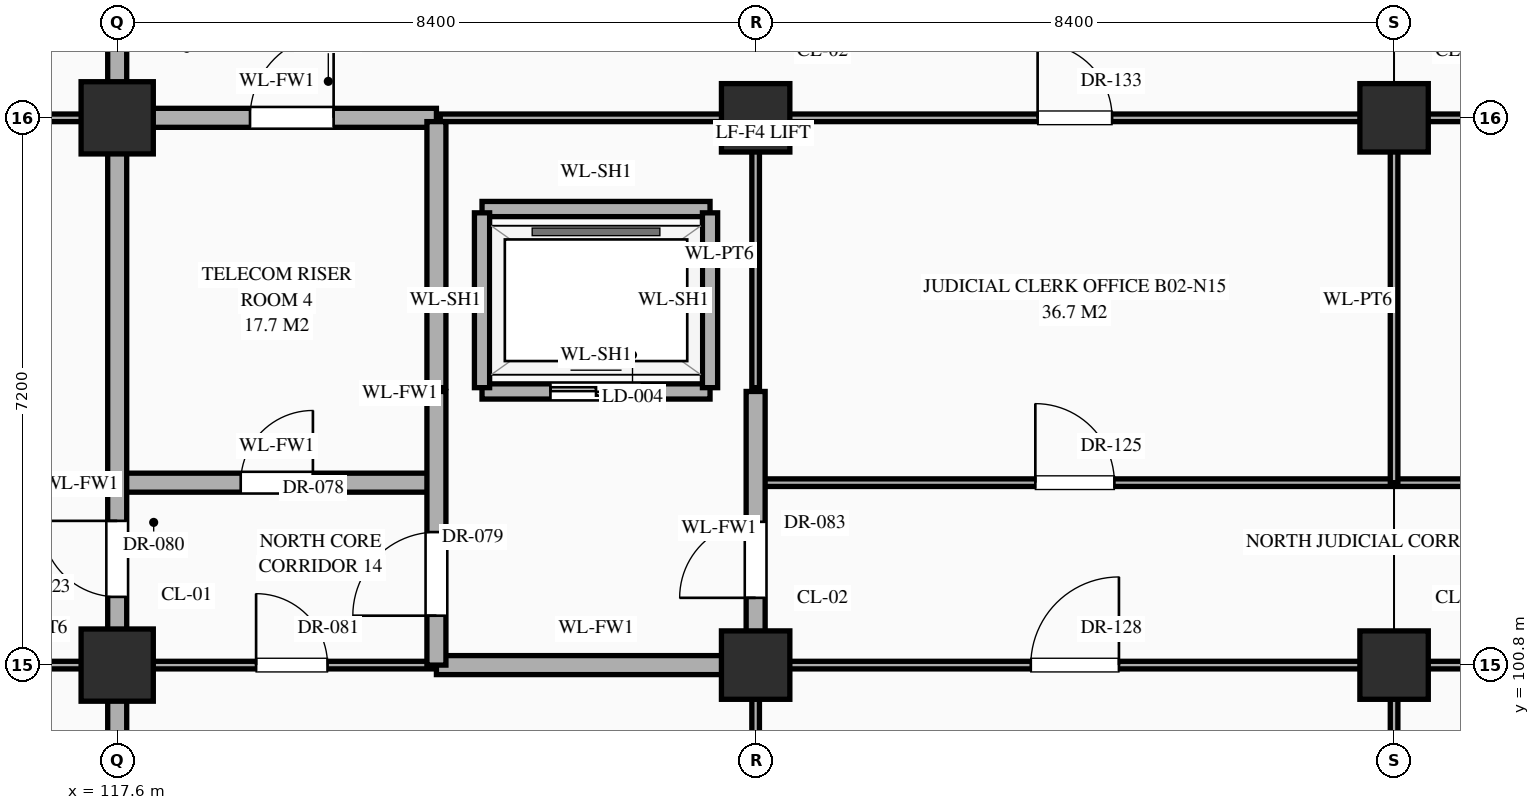
"""IFC4 building model, lengths in metres.
Left out: names, types, materials, properties, quantities, classifications, styles, units other than length and angle.
Written with IfcOpenShell. Run it as: python <this file> out.ifc"""

import sys

from ifc_helpers import new_model, si_unit, direction, frame, frame_2d, origin, origin_2d, place, context, subcontext, project, spatial, rectangle, extrude, element, fill, save


model = new_model("IFC4")
c1 = context("Model", 3, precision=1e-05, world=origin(), true_north=direction((0.0, 1.0)))
c2 = subcontext(c1, "Body", "Model", "MODEL_VIEW")
j1 = project(units=[si_unit("LENGTHUNIT", "METRE"), si_unit("PLANEANGLEUNIT", "RADIAN")], contexts=[c1])
p1 = place(None, origin())
s1 = spatial("IfcSite", under=j1, at=p1, CompositionType="ELEMENT")
p2 = place(p1, origin())
s2 = spatial("IfcBuilding", under=s1, at=p2, CompositionType="ELEMENT")
p3 = place(p2, frame((0.0, 0.0, -10.2)))
s3 = spatial("IfcBuildingStorey", under=s2, at=p3, CompositionType="ELEMENT", Elevation=-10.2)
for number, where, z_axis, x_axis in (
    (1, (117.6, 100.8, 0.0), (0.0, 0.0, 1.0), (1.0, 0.0, 0.0)),
    (2, (117.6, 108.0, 0.0), (0.0, 0.0, 1.0), (1.0, 0.0, 0.0)),
):
    element("IfcColumn", number, at=place(p3, frame(where, z_axis=z_axis, x_axis=x_axis)), inside=s3, PredefinedType="COLUMN", context=c2, shape_type="SweptSolid", body=[
        extrude(rectangle(XDim=0.95, YDim=0.95, at=origin_2d()), origin(), (0.0, 0.0, 1.0), 4.8),
    ])
for number, where, z_axis, x_axis in (
    (3, (126.0, 100.8, 0.0), (0.0, 0.0, 1.0), (1.0, 0.0, 0.0)),
    (4, (126.0, 108.0, 0.0), (0.0, 0.0, 1.0), (1.0, 0.0, 0.0)),
    (5, (134.4, 100.8, 0.0), (0.0, 0.0, 1.0), (1.0, 0.0, 0.0)),
    (6, (134.4, 108.0, 0.0), (0.0, 0.0, 1.0), (1.0, 0.0, 0.0)),
):
    element("IfcColumn", number, at=place(p3, frame(where, z_axis=z_axis, x_axis=x_axis)), inside=s3, PredefinedType="COLUMN", context=c2, shape_type="SweptSolid", body=[
        extrude(rectangle(XDim=0.9, YDim=0.9, at=origin_2d()), origin(), (0.0, 0.0, 1.0), 4.8),
    ])
p4 = place(p3, frame((109.2, 100.8, 0.0), z_axis=(0.0, 0.0, 1.0), x_axis=(1.0, 0.0, 0.0)))
e7 = element("IfcWall", 7, at=p4, inside=s3, PredefinedType="STANDARD", context=c2, shape_type="SweptSolid", body=[
    extrude(rectangle(XDim=12.6, YDim=0.1, at=frame_2d((6.3, 0.0))), origin(), (0.0, 0.0, 1.0), 3.63),
])
p5 = place(p4, frame((10.228, 0.0, 0.0)))
e8 = element("IfcOpeningElement", 8, at=p5, cuts=e7, PredefinedType="OPENING", context=c2, shape_type="SweptSolid", body=[
    extrude(rectangle(XDim=0.94, YDim=2.3, at=frame_2d((0.47, 1.15))), frame((0.0, 0.062, 0.0), z_axis=(0.0, -1.0, 0.0), x_axis=(1.0, 0.0, 0.0)), (0.0, 0.0, 1.0), 0.124),
])
p6 = place(p4, frame((1.468, 0.0, 0.0)))
e9 = element("IfcOpeningElement", 9, at=p6, cuts=e7, PredefinedType="OPENING", context=c2, shape_type="SweptSolid", body=[
    extrude(rectangle(XDim=0.86, YDim=2.1, at=frame_2d((0.43, 1.05))), frame((0.0, 0.062, 0.0), z_axis=(0.0, -1.0, 0.0), x_axis=(1.0, 0.0, 0.0)), (0.0, 0.0, 1.0), 0.124),
])
p7 = place(p4, frame((4.14, 0.0, 0.0)))
e10 = element("IfcOpeningElement", 10, at=p7, cuts=e7, PredefinedType="OPENING", context=c2, shape_type="SweptSolid", body=[
    extrude(rectangle(XDim=0.92, YDim=2.15, at=frame_2d((0.46, 1.075))), frame((0.0, 0.062, 0.0), z_axis=(0.0, -1.0, 0.0), x_axis=(1.0, 0.0, 0.0)), (0.0, 0.0, 1.0), 0.124),
])
p8 = place(p4, frame((6.423, 0.0, 0.0)))
e11 = element("IfcOpeningElement", 11, at=p8, cuts=e7, PredefinedType="OPENING", context=c2, shape_type="SweptSolid", body=[
    extrude(rectangle(XDim=0.96, YDim=2.2, at=frame_2d((0.48, 1.1))), frame((0.0, 0.062, 0.0), z_axis=(0.0, -1.0, 0.0), x_axis=(1.0, 0.0, 0.0)), (0.0, 0.0, 1.0), 0.124),
])
p9 = place(p3, frame((121.8, 100.8, 0.0), z_axis=(0.0, 0.0, 1.0), x_axis=(1.0, 0.0, 0.0)))
e12 = element("IfcWall", 12, at=p9, inside=s3, PredefinedType="STANDARD", context=c2, shape_type="SweptSolid", body=[
    extrude(rectangle(XDim=4.2, YDim=0.25, at=frame_2d((2.1, 0.0))), origin(), (0.0, 0.0, 1.0), 3.63),
])
p10 = place(p3, frame((126.0, 100.8, 0.0), z_axis=(0.0, 0.0, 1.0), x_axis=(1.0, 0.0, 0.0)))
e13 = element("IfcWall", 13, at=p10, inside=s3, PredefinedType="STANDARD", context=c2, shape_type="SweptSolid", body=[
    extrude(rectangle(XDim=25.2, YDim=0.1, at=frame_2d((12.6, 0.0))), origin(), (0.0, 0.0, 1.0), 3.63),
])
p11 = place(p10, frame((3.62, 0.0, 0.0)))
e14 = element("IfcOpeningElement", 14, at=p11, cuts=e13, PredefinedType="OPENING", context=c2, shape_type="SweptSolid", body=[
    extrude(rectangle(XDim=1.16, YDim=2.3, at=frame_2d((0.58, 1.15))), frame((0.0, 0.062, 0.0), z_axis=(0.0, -1.0, 0.0), x_axis=(1.0, 0.0, 0.0)), (0.0, 0.0, 1.0), 0.124),
])
p12 = place(p10, frame((9.685, 0.0, 0.0)))
e15 = element("IfcOpeningElement", 15, at=p12, cuts=e13, PredefinedType="OPENING", context=c2, shape_type="SweptSolid", body=[
    extrude(rectangle(XDim=1.2, YDim=2.35, at=frame_2d((0.6, 1.175))), frame((0.0, 0.062, 0.0), z_axis=(0.0, -1.0, 0.0), x_axis=(1.0, 0.0, 0.0)), (0.0, 0.0, 1.0), 0.124),
])
p13 = place(p10, frame((12.38, 0.0, 0.0)))
e16 = element("IfcOpeningElement", 16, at=p13, cuts=e13, PredefinedType="OPENING", context=c2, shape_type="SweptSolid", body=[
    extrude(rectangle(XDim=1.24, YDim=2.3, at=frame_2d((0.62, 1.15))), frame((0.0, 0.062, 0.0), z_axis=(0.0, -1.0, 0.0), x_axis=(1.0, 0.0, 0.0)), (0.0, 0.0, 1.0), 0.124),
])
p14 = place(p10, frame((14.675, 0.0, 0.0)))
e17 = element("IfcOpeningElement", 17, at=p14, cuts=e13, PredefinedType="OPENING", context=c2, shape_type="SweptSolid", body=[
    extrude(rectangle(XDim=1.28, YDim=2.35, at=frame_2d((0.64, 1.175))), frame((0.0, 0.062, 0.0), z_axis=(0.0, -1.0, 0.0), x_axis=(1.0, 0.0, 0.0)), (0.0, 0.0, 1.0), 0.124),
])
p15 = place(p10, frame((20.542, 0.0, 0.0)))
e18 = element("IfcOpeningElement", 18, at=p15, cuts=e13, PredefinedType="OPENING", context=c2, shape_type="SweptSolid", body=[
    extrude(rectangle(XDim=0.94, YDim=2.3, at=frame_2d((0.47, 1.15))), frame((0.0, 0.062, 0.0), z_axis=(0.0, -1.0, 0.0), x_axis=(1.0, 0.0, 0.0)), (0.0, 0.0, 1.0), 0.124),
])
p16 = place(p3, frame((109.2, 103.2, 0.0), z_axis=(0.0, 0.0, 1.0), x_axis=(1.0, 0.0, 0.0)))
e19 = element("IfcWall", 19, at=p16, inside=s3, PredefinedType="STANDARD", context=c2, shape_type="SweptSolid", body=[
    extrude(rectangle(XDim=8.4, YDim=0.1, at=frame_2d((4.2, 0.0))), origin(), (0.0, 0.0, 1.0), 4.48),
])
p17 = place(p16, frame((3.75, 0.0, 0.0)))
e20 = element("IfcOpeningElement", 20, at=p17, cuts=e19, PredefinedType="OPENING", context=c2, shape_type="SweptSolid", body=[
    extrude(rectangle(XDim=0.9, YDim=2.15, at=frame_2d((0.45, 1.075))), frame((0.0, 0.062, 0.0), z_axis=(0.0, -1.0, 0.0), x_axis=(1.0, 0.0, 0.0)), (0.0, 0.0, 1.0), 0.124),
])
p18 = place(p3, frame((117.6, 103.2, 0.0), z_axis=(0.0, 0.0, 1.0), x_axis=(1.0, 0.0, 0.0)))
e21 = element("IfcWall", 21, at=p18, inside=s3, PredefinedType="STANDARD", context=c2, shape_type="SweptSolid", body=[
    extrude(rectangle(XDim=4.2, YDim=0.25, at=frame_2d((2.1, 0.0))), origin(), (0.0, 0.0, 1.0), 4.48),
])
p19 = place(p18, frame((1.625, 0.0, 0.0)))
e22 = element("IfcOpeningElement", 22, at=p19, cuts=e21, PredefinedType="OPENING", context=c2, shape_type="SweptSolid", body=[
    extrude(rectangle(XDim=0.95, YDim=2.15, at=frame_2d((0.475, 1.075))), frame((0.0, 0.137, 0.0), z_axis=(0.0, -1.0, 0.0), x_axis=(1.0, 0.0, 0.0)), (0.0, 0.0, 1.0), 0.274),
])
p20 = place(p3, frame((126.0, 103.2, 0.0), z_axis=(0.0, 0.0, 1.0), x_axis=(1.0, 0.0, 0.0)))
e23 = element("IfcWall", 23, at=p20, inside=s3, PredefinedType="STANDARD", context=c2, shape_type="SweptSolid", body=[
    extrude(rectangle(XDim=25.2, YDim=0.1, at=frame_2d((12.6, 0.0))), origin(), (0.0, 0.0, 1.0), 4.48),
])
p21 = place(p20, frame((3.68, 0.0, 0.0)))
e24 = element("IfcOpeningElement", 24, at=p21, cuts=e23, PredefinedType="OPENING", context=c2, shape_type="SweptSolid", body=[
    extrude(rectangle(XDim=1.04, YDim=2.2, at=frame_2d((0.52, 1.1))), frame((0.0, 0.062, 0.0), z_axis=(0.0, -1.0, 0.0), x_axis=(1.0, 0.0, 0.0)), (0.0, 0.0, 1.0), 0.124),
])
p22 = place(p20, frame((12.06, 0.0, 0.0)))
e25 = element("IfcOpeningElement", 25, at=p22, cuts=e23, PredefinedType="OPENING", context=c2, shape_type="SweptSolid", body=[
    extrude(rectangle(XDim=1.08, YDim=2.25, at=frame_2d((0.54, 1.125))), frame((0.0, 0.062, 0.0), z_axis=(0.0, -1.0, 0.0), x_axis=(1.0, 0.0, 0.0)), (0.0, 0.0, 1.0), 0.124),
])
p23 = place(p20, frame((20.44, 0.0, 0.0)))
e26 = element("IfcOpeningElement", 26, at=p23, cuts=e23, PredefinedType="OPENING", context=c2, shape_type="SweptSolid", body=[
    extrude(rectangle(XDim=1.12, YDim=2.25, at=frame_2d((0.56, 1.125))), frame((0.0, 0.062, 0.0), z_axis=(0.0, -1.0, 0.0), x_axis=(1.0, 0.0, 0.0)), (0.0, 0.0, 1.0), 0.124),
])
p24 = place(p3, frame((122.4, 104.4, 0.0), z_axis=(0.0, 0.0, 1.0), x_axis=(1.0, 0.0, 0.0)))
e27 = element("IfcWall", 27, at=p24, inside=s3, PredefinedType="STANDARD", context=c2, shape_type="SweptSolid", body=[
    extrude(rectangle(XDim=3.0, YDim=0.2, at=frame_2d((1.5, 0.0))), origin(), (0.0, 0.0, 1.0), 4.48),
])
p25 = place(p24, frame((0.9, 0.0, 0.0)))
e28 = element("IfcOpeningElement", 28, at=p25, cuts=e27, PredefinedType="OPENING", context=c2, shape_type="SweptSolid", body=[
    extrude(rectangle(XDim=1.2, YDim=2.15, at=frame_2d((0.6, 1.075))), frame((0.0, 0.112, 0.0), z_axis=(0.0, -1.0, 0.0), x_axis=(1.0, 0.0, 0.0)), (0.0, 0.0, 1.0), 0.224),
])
p26 = place(p3, frame((122.4, 106.8, 0.0), z_axis=(0.0, 0.0, 1.0), x_axis=(1.0, 0.0, 0.0)))
e29 = element("IfcWall", 29, at=p26, inside=s3, PredefinedType="STANDARD", context=c2, shape_type="SweptSolid", body=[
    extrude(rectangle(XDim=3.0, YDim=0.2, at=frame_2d((1.5, 0.0))), origin(), (0.0, 0.0, 1.0), 4.48),
])
p27 = place(p3, frame((109.2, 108.0, 0.0), z_axis=(0.0, 0.0, 1.0), x_axis=(1.0, 0.0, 0.0)))
e30 = element("IfcWall", 30, at=p27, inside=s3, PredefinedType="STANDARD", context=c2, shape_type="SweptSolid", body=[
    extrude(rectangle(XDim=8.4, YDim=0.1, at=frame_2d((4.2, 0.0))), origin(), (0.0, 0.0, 1.0), 3.63),
])
p28 = place(p27, frame((3.7, 0.0, 0.0)))
e31 = element("IfcOpeningElement", 31, at=p28, cuts=e30, PredefinedType="OPENING", context=c2, shape_type="SweptSolid", body=[
    extrude(rectangle(XDim=1.0, YDim=2.25, at=frame_2d((0.5, 1.125))), frame((0.0, 0.062, 0.0), z_axis=(0.0, -1.0, 0.0), x_axis=(1.0, 0.0, 0.0)), (0.0, 0.0, 1.0), 0.124),
])
p29 = place(p3, frame((117.6, 108.0, 0.0), z_axis=(0.0, 0.0, 1.0), x_axis=(1.0, 0.0, 0.0)))
e32 = element("IfcWall", 32, at=p29, inside=s3, PredefinedType="STANDARD", context=c2, shape_type="SweptSolid", body=[
    extrude(rectangle(XDim=4.2, YDim=0.25, at=frame_2d((2.1, 0.0))), origin(), (0.0, 0.0, 1.0), 3.63),
])
p30 = place(p29, frame((1.748, 0.0, 0.0)))
e33 = element("IfcOpeningElement", 33, at=p30, cuts=e32, PredefinedType="OPENING", context=c2, shape_type="SweptSolid", body=[
    extrude(rectangle(XDim=1.1, YDim=2.2, at=frame_2d((0.55, 1.1))), frame((0.0, 0.137, 0.0), z_axis=(0.0, -1.0, 0.0), x_axis=(1.0, 0.0, 0.0)), (0.0, 0.0, 1.0), 0.274),
])
p31 = place(p3, frame((121.85, 108.0, 0.0), z_axis=(0.0, 0.0, 1.0), x_axis=(1.0, 0.0, 0.0)))
e34 = element("IfcWall", 34, at=p31, inside=s3, PredefinedType="STANDARD", context=c2, shape_type="SweptSolid", body=[
    extrude(rectangle(XDim=4.1, YDim=0.1, at=frame_2d((2.05, 0.0))), origin(), (0.0, 0.0, 1.0), 3.63),
])
p32 = place(p3, frame((126.0, 108.0, 0.0), z_axis=(0.0, 0.0, 1.0), x_axis=(1.0, 0.0, 0.0)))
e35 = element("IfcWall", 35, at=p32, inside=s3, PredefinedType="STANDARD", context=c2, shape_type="SweptSolid", body=[
    extrude(rectangle(XDim=25.2, YDim=0.1, at=frame_2d((12.6, 0.0))), origin(), (0.0, 0.0, 1.0), 3.63),
])
p33 = place(p32, frame((3.71, 0.0, 0.0)))
e36 = element("IfcOpeningElement", 36, at=p33, cuts=e35, PredefinedType="OPENING", context=c2, shape_type="SweptSolid", body=[
    extrude(rectangle(XDim=0.98, YDim=2.35, at=frame_2d((0.49, 1.175))), frame((0.0, 0.062, 0.0), z_axis=(0.0, -1.0, 0.0), x_axis=(1.0, 0.0, 0.0)), (0.0, 0.0, 1.0), 0.124),
])
p34 = place(p32, frame((12.09, 0.0, 0.0)))
e37 = element("IfcOpeningElement", 37, at=p34, cuts=e35, PredefinedType="OPENING", context=c2, shape_type="SweptSolid", body=[
    extrude(rectangle(XDim=1.02, YDim=2.4, at=frame_2d((0.51, 1.2))), frame((0.0, 0.062, 0.0), z_axis=(0.0, -1.0, 0.0), x_axis=(1.0, 0.0, 0.0)), (0.0, 0.0, 1.0), 0.124),
])
p35 = place(p32, frame((20.482, 0.0, 0.0)))
e38 = element("IfcOpeningElement", 38, at=p35, cuts=e35, PredefinedType="OPENING", context=c2, shape_type="SweptSolid", body=[
    extrude(rectangle(XDim=1.06, YDim=2.4, at=frame_2d((0.53, 1.2))), frame((0.0, 0.062, 0.0), z_axis=(0.0, -1.0, 0.0), x_axis=(1.0, 0.0, 0.0)), (0.0, 0.0, 1.0), 0.124),
])
p36 = place(p3, frame((117.6, 91.2, 0.0), z_axis=(0.0, 0.0, 1.0), x_axis=(0.0, 1.0, 0.0)))
e39 = element("IfcWall", 39, at=p36, inside=s3, PredefinedType="STANDARD", context=c2, shape_type="SweptSolid", body=[
    extrude(rectangle(XDim=23.96, YDim=0.25, at=frame_2d((11.98, 0.0))), origin(), (0.0, 0.0, 1.0), 3.73),
])
p37 = place(p36, frame((0.452, 0.0, 0.0)))
e40 = element("IfcOpeningElement", 40, at=p37, cuts=e39, PredefinedType="OPENING", context=c2, shape_type="SweptSolid", body=[
    extrude(rectangle(XDim=1.1, YDim=2.2, at=frame_2d((0.55, 1.1))), frame((0.0, 0.137, 0.0), z_axis=(0.0, -1.0, 0.0), x_axis=(1.0, 0.0, 0.0)), (0.0, 0.0, 1.0), 0.274),
])
p38 = place(p36, frame((10.498, 0.0, 0.0)))
e41 = element("IfcOpeningElement", 41, at=p38, cuts=e39, PredefinedType="OPENING", context=c2, shape_type="SweptSolid", body=[
    extrude(rectangle(XDim=1.0, YDim=2.2, at=frame_2d((0.5, 1.1))), frame((0.0, 0.137, 0.0), z_axis=(0.0, -1.0, 0.0), x_axis=(1.0, 0.0, 0.0)), (0.0, 0.0, 1.0), 0.274),
])
p39 = place(p36, frame((3.323, 0.0, 0.0)))
e42 = element("IfcOpeningElement", 42, at=p39, cuts=e39, PredefinedType="OPENING", context=c2, shape_type="SweptSolid", body=[
    extrude(rectangle(XDim=0.95, YDim=2.15, at=frame_2d((0.475, 1.075))), frame((0.0, 0.137, 0.0), z_axis=(0.0, -1.0, 0.0), x_axis=(1.0, 0.0, 0.0)), (0.0, 0.0, 1.0), 0.274),
])
p40 = place(p36, frame((17.698, 0.0, 0.0)))
e43 = element("IfcOpeningElement", 43, at=p40, cuts=e39, PredefinedType="OPENING", context=c2, shape_type="SweptSolid", body=[
    extrude(rectangle(XDim=1.0, YDim=2.2, at=frame_2d((0.5, 1.1))), frame((0.0, 0.137, 0.0), z_axis=(0.0, -1.0, 0.0), x_axis=(1.0, 0.0, 0.0)), (0.0, 0.0, 1.0), 0.274),
])
p41 = place(p3, frame((121.8, 100.8, 0.0), z_axis=(0.0, 0.0, 1.0), x_axis=(0.0, 1.0, 0.0)))
e44 = element("IfcWall", 44, at=p41, inside=s3, PredefinedType="STANDARD", context=c2, shape_type="SweptSolid", body=[
    extrude(rectangle(XDim=3.6, YDim=0.25, at=frame_2d((1.8, 0.0))), origin(), (0.0, 0.0, 1.0), 4.48),
])
p42 = place(p41, frame((0.65, 0.0, 0.0)))
e45 = element("IfcOpeningElement", 45, at=p42, cuts=e44, PredefinedType="OPENING", context=c2, shape_type="SweptSolid", body=[
    extrude(rectangle(XDim=1.1, YDim=2.2, at=frame_2d((0.55, 1.1))), frame((0.0, 0.137, 0.0), z_axis=(0.0, -1.0, 0.0), x_axis=(1.0, 0.0, 0.0)), (0.0, 0.0, 1.0), 0.274),
])
p43 = place(p3, frame((121.8, 104.45, 0.0), z_axis=(0.0, 0.0, 1.0), x_axis=(0.0, 1.0, 0.0)))
e46 = element("IfcWall", 46, at=p43, inside=s3, PredefinedType="STANDARD", context=c2, shape_type="SweptSolid", body=[
    extrude(rectangle(XDim=3.5, YDim=0.25, at=frame_2d((1.75, 0.0))), origin(), (0.0, 0.0, 1.0), 4.48),
])
for number, where, z_axis, x_axis in (
    (47, (122.4, 104.45, 0.0), (0.0, 0.0, 1.0), (0.0, 1.0, 0.0)),
    (48, (125.4, 104.45, 0.0), (0.0, 0.0, 1.0), (0.0, 1.0, 0.0)),
):
    element("IfcWall", number, at=place(p3, frame(where, z_axis=z_axis, x_axis=x_axis)), inside=s3, PredefinedType="STANDARD", context=c2, shape_type="SweptSolid", body=[
        extrude(rectangle(XDim=2.3, YDim=0.2, at=frame_2d((1.15, 0.0))), origin(), (0.0, 0.0, 1.0), 4.48),
    ])
p44 = place(p3, frame((126.0, 96.0, 0.0), z_axis=(0.0, 0.0, 1.0), x_axis=(0.0, 1.0, 0.0)))
e49 = element("IfcWall", 49, at=p44, inside=s3, PredefinedType="STANDARD", context=c2, shape_type="SweptSolid", body=[
    extrude(rectangle(XDim=4.8, YDim=0.1, at=frame_2d((2.4, 0.0))), origin(), (0.0, 0.0, 1.0), 3.73),
])
p45 = place(p3, frame((126.0, 100.8, 0.0), z_axis=(0.0, 0.0, 1.0), x_axis=(0.0, 1.0, 0.0)))
e50 = element("IfcWall", 50, at=p45, inside=s3, PredefinedType="STANDARD", context=c2, shape_type="SweptSolid", body=[
    extrude(rectangle(XDim=3.6, YDim=0.25, at=frame_2d((1.8, 0.0))), origin(), (0.0, 0.0, 1.0), 3.73),
])
p46 = place(p45, frame((0.885, 0.0, 0.0)))
e51 = element("IfcOpeningElement", 51, at=p46, cuts=e50, PredefinedType="OPENING", context=c2, shape_type="SweptSolid", body=[
    extrude(rectangle(XDim=1.0, YDim=2.2, at=frame_2d((0.5, 1.1))), frame((0.0, 0.137, 0.0), z_axis=(0.0, -1.0, 0.0), x_axis=(1.0, 0.0, 0.0)), (0.0, 0.0, 1.0), 0.274),
])
p47 = place(p3, frame((126.0, 104.45, 0.0), z_axis=(0.0, 0.0, 1.0), x_axis=(0.0, 1.0, 0.0)))
e52 = element("IfcWall", 52, at=p47, inside=s3, PredefinedType="STANDARD", context=c2, shape_type="SweptSolid", body=[
    extrude(rectangle(XDim=3.5, YDim=0.1, at=frame_2d((1.75, 0.0))), origin(), (0.0, 0.0, 1.0), 3.73),
])
for number, where, z_axis, x_axis in (
    (53, (134.4, 96.0, 0.0), (0.0, 0.0, 1.0), (0.0, 1.0, 0.0)),
    (54, (134.4, 103.2, 0.0), (0.0, 0.0, 1.0), (0.0, 1.0, 0.0)),
):
    element("IfcWall", number, at=place(p3, frame(where, z_axis=z_axis, x_axis=x_axis)), inside=s3, PredefinedType="STANDARD", context=c2, shape_type="SweptSolid", body=[
        extrude(rectangle(XDim=4.8, YDim=0.1, at=frame_2d((2.4, 0.0))), origin(), (0.0, 0.0, 1.0), 3.73),
    ])
p48 = place(p25, origin())
e55 = element("IfcDoor", 55, at=p48, inside=s3, OperationType="DOUBLE_DOOR_SLIDING", PredefinedType="DOOR", context=c2, shape_type="SweptSolid", body=[
    extrude(rectangle(XDim=1.2, YDim=2.15, at=frame_2d((0.6, 1.075))), frame((0.0, 0.025, 0.0), z_axis=(0.0, -1.0, 0.0), x_axis=(1.0, 0.0, 0.0)), (0.0, 0.0, 1.0), 0.05),
])
fill(e28, e55)
p49 = place(p19, origin())
e56 = element("IfcDoor", 56, at=p49, inside=s3, OperationType="SINGLE_SWING_RIGHT", PredefinedType="DOOR", context=c2, shape_type="SweptSolid", body=[
    extrude(rectangle(XDim=0.95, YDim=2.15, at=frame_2d((0.475, 1.075))), frame((0.0, 0.025, 0.0), z_axis=(0.0, -1.0, 0.0), x_axis=(1.0, 0.0, 0.0)), (0.0, 0.0, 1.0), 0.05),
])
fill(e22, e56)
p50 = place(p42, origin())
e57 = element("IfcDoor", 57, at=p50, inside=s3, OperationType="SINGLE_SWING_LEFT", PredefinedType="DOOR", context=c2, shape_type="SweptSolid", body=[
    extrude(rectangle(XDim=1.1, YDim=2.2, at=frame_2d((0.55, 1.1))), frame((0.0, 0.025, 0.0), z_axis=(0.0, -1.0, 0.0), x_axis=(1.0, 0.0, 0.0)), (0.0, 0.0, 1.0), 0.05),
])
fill(e45, e57)
p51 = place(p38, origin())
e58 = element("IfcDoor", 58, at=p51, inside=s3, OperationType="SINGLE_SWING_RIGHT", PredefinedType="DOOR", context=c2, shape_type="SweptSolid", body=[
    extrude(rectangle(XDim=1.0, YDim=2.2, at=frame_2d((0.5, 1.1))), frame((0.0, 0.025, 0.0), z_axis=(0.0, -1.0, 0.0), x_axis=(1.0, 0.0, 0.0)), (0.0, 0.0, 1.0), 0.05),
])
fill(e41, e58)
p52 = place(p5, origin())
e59 = element("IfcDoor", 59, at=p52, inside=s3, OperationType="SINGLE_SWING_LEFT", PredefinedType="DOOR", context=c2, shape_type="SweptSolid", body=[
    extrude(rectangle(XDim=0.94, YDim=2.3, at=frame_2d((0.47, 1.15))), frame((0.0, 0.025, 0.0), z_axis=(0.0, -1.0, 0.0), x_axis=(1.0, 0.0, 0.0)), (0.0, 0.0, 1.0), 0.05),
])
fill(e8, e59)
p53 = place(p30, origin())
e60 = element("IfcDoor", 60, at=p53, inside=s3, OperationType="SINGLE_SWING_RIGHT", PredefinedType="DOOR", context=c2, shape_type="SweptSolid", body=[
    extrude(rectangle(XDim=1.1, YDim=2.2, at=frame_2d((0.55, 1.1))), frame((0.0, 0.025, 0.0), z_axis=(0.0, -1.0, 0.0), x_axis=(1.0, 0.0, 0.0)), (0.0, 0.0, 1.0), 0.05),
])
fill(e33, e60)
p54 = place(p46, origin())
e61 = element("IfcDoor", 61, at=p54, inside=s3, OperationType="SINGLE_SWING_LEFT", PredefinedType="DOOR", context=c2, shape_type="SweptSolid", body=[
    extrude(rectangle(XDim=1.0, YDim=2.2, at=frame_2d((0.5, 1.1))), frame((0.0, 0.025, 0.0), z_axis=(0.0, -1.0, 0.0), x_axis=(1.0, 0.0, 0.0)), (0.0, 0.0, 1.0), 0.05),
])
fill(e51, e61)
p55 = place(p21, origin())
e62 = element("IfcDoor", 62, at=p55, inside=s3, OperationType="SINGLE_SWING_LEFT", PredefinedType="DOOR", context=c2, shape_type="SweptSolid", body=[
    extrude(rectangle(XDim=1.04, YDim=2.2, at=frame_2d((0.52, 1.1))), frame((0.0, 0.025, 0.0), z_axis=(0.0, -1.0, 0.0), x_axis=(1.0, 0.0, 0.0)), (0.0, 0.0, 1.0), 0.05),
])
fill(e24, e62)
p56 = place(p11, origin())
e63 = element("IfcDoor", 63, at=p56, inside=s3, OperationType="SINGLE_SWING_RIGHT", PredefinedType="DOOR", context=c2, shape_type="SweptSolid", body=[
    extrude(rectangle(XDim=1.16, YDim=2.3, at=frame_2d((0.58, 1.15))), frame((0.0, 0.025, 0.0), z_axis=(0.0, -1.0, 0.0), x_axis=(1.0, 0.0, 0.0)), (0.0, 0.0, 1.0), 0.05),
])
fill(e14, e63)
p57 = place(p33, origin())
e64 = element("IfcDoor", 64, at=p57, inside=s3, OperationType="SINGLE_SWING_LEFT", PredefinedType="DOOR", context=c2, shape_type="SweptSolid", body=[
    extrude(rectangle(XDim=0.98, YDim=2.35, at=frame_2d((0.49, 1.175))), frame((0.0, 0.025, 0.0), z_axis=(0.0, -1.0, 0.0), x_axis=(1.0, 0.0, 0.0)), (0.0, 0.0, 1.0), 0.05),
])
fill(e36, e64)
save(model, sys.argv[1])
